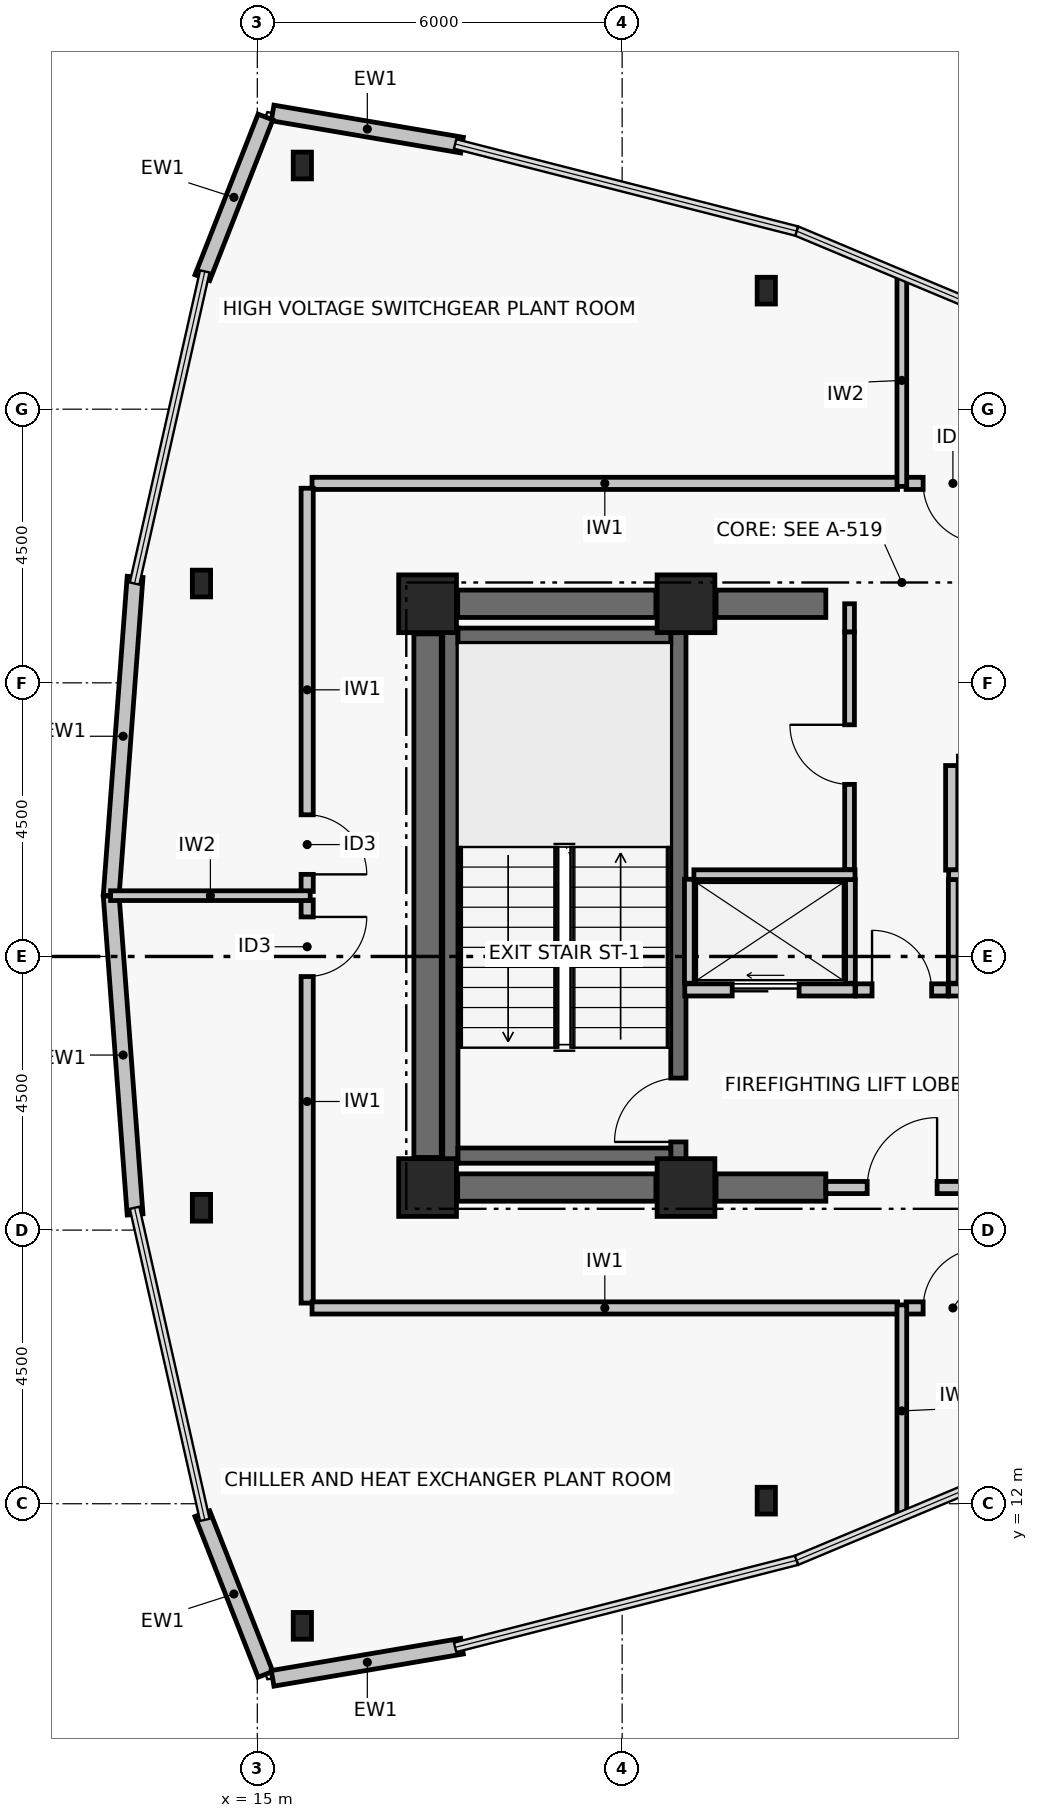
"""IFC4 building model, lengths in metres.
Left out: names, types, materials, properties, quantities, classifications, styles, units other than length and angle.
Written with IfcOpenShell. Run it as: python <this file> out.ifc"""

import sys

from ifc_helpers import new_model, si_unit, direction, frame, frame_2d, origin, origin_2d, place, context, subcontext, project, spatial, rectangle, i_section, extrude, element, fill, save


model = new_model("IFC4")
c1 = context("Model", 3, precision=1e-05, world=origin(), true_north=direction((0.0, 1.0)))
c2 = subcontext(c1, "Body", "Model", "MODEL_VIEW")
j1 = project(units=[si_unit("LENGTHUNIT", "METRE"), si_unit("PLANEANGLEUNIT", "RADIAN")], contexts=[c1])
p1 = place(None, origin())
s1 = spatial("IfcSite", under=j1, at=p1, CompositionType="ELEMENT")
p2 = place(p1, origin())
s2 = spatial("IfcBuilding", under=s1, at=p2, CompositionType="ELEMENT")
p3 = place(p2, frame((0.0, 0.0, 299.22)))
s3 = spatial("IfcBuildingStorey", under=s2, at=p3, CompositionType="ELEMENT", Elevation=299.22)
for number, where, z_axis, x_axis in (
    (1, (17.8, 17.2, 0.0), (0.0, 0.0, 1.0), (1.0, 0.0, 0.0)),
    (2, (22.05, 17.2, 0.0), (0.0, 0.0, 1.0), (1.0, 0.0, 0.0)),
    (3, (17.8, 26.8, 0.0), (0.0, 0.0, 1.0), (1.0, 0.0, 0.0)),
    (4, (22.05, 26.8, 0.0), (0.0, 0.0, 1.0), (1.0, 0.0, 0.0)),
):
    element("IfcColumn", number, at=place(p3, frame(where, z_axis=z_axis, x_axis=x_axis)), inside=s3, PredefinedType="COLUMN", context=c2, shape_type="SweptSolid", body=[
        extrude(rectangle(XDim=0.95, YDim=0.95, at=origin_2d()), origin(), (0.0, 0.0, 1.0), 3.2),
    ])
p4 = place(p3, frame((18.295, 17.2, 0.0), z_axis=(0.0, 0.0, 1.0), x_axis=(1.0, 0.0, 0.0)))
e5 = element("IfcWall", 5, at=p4, inside=s3, PredefinedType="SHEAR", context=c2, shape_type="SweptSolid", body=[
    extrude(rectangle(XDim=3.26, YDim=0.45, at=frame_2d((1.63, 0.0))), origin(), (0.0, 0.0, 1.0), 2.98),
])
p5 = place(p3, frame((22.545, 17.2, 0.0), z_axis=(0.0, 0.0, 1.0), x_axis=(1.0, 0.0, 0.0)))
e6 = element("IfcWall", 6, at=p5, inside=s3, PredefinedType="SHEAR", context=c2, shape_type="SweptSolid", body=[
    extrude(rectangle(XDim=1.805, YDim=0.45, at=frame_2d((0.903, 0.0))), origin(), (0.0, 0.0, 1.0), 2.98),
])
p6 = place(p3, frame((18.295, 26.8, 0.0), z_axis=(0.0, 0.0, 1.0), x_axis=(1.0, 0.0, 0.0)))
e7 = element("IfcWall", 7, at=p6, inside=s3, PredefinedType="SHEAR", context=c2, shape_type="SweptSolid", body=[
    extrude(rectangle(XDim=3.26, YDim=0.45, at=frame_2d((1.63, 0.0))), origin(), (0.0, 0.0, 1.0), 2.98),
])
p7 = place(p3, frame((22.545, 26.8, 0.0), z_axis=(0.0, 0.0, 1.0), x_axis=(1.0, 0.0, 0.0)))
e8 = element("IfcWall", 8, at=p7, inside=s3, PredefinedType="SHEAR", context=c2, shape_type="SweptSolid", body=[
    extrude(rectangle(XDim=1.805, YDim=0.45, at=frame_2d((0.903, 0.0))), origin(), (0.0, 0.0, 1.0), 2.98),
])
p8 = place(p3, frame((17.8, 17.695, 0.0), z_axis=(0.0, 0.0, 1.0), x_axis=(0.0, 1.0, 0.0)))
e9 = element("IfcWall", 9, at=p8, inside=s3, PredefinedType="SHEAR", context=c2, shape_type="SweptSolid", body=[
    extrude(rectangle(XDim=8.61, YDim=0.45, at=frame_2d((4.305, 0.0))), origin(), (0.0, 0.0, 1.0), 2.98),
])
p9 = place(p3, frame((18.175, 17.6, 0.0), z_axis=(0.0, 0.0, 1.0), x_axis=(0.0, 1.0, 0.0)))
e10 = element("IfcWall", 10, at=p9, inside=s3, PredefinedType="SHEAR", context=c2, shape_type="SweptSolid", body=[
    extrude(rectangle(XDim=8.8, YDim=0.25, at=frame_2d((4.4, 0.0))), origin(), (0.0, 0.0, 1.0), 2.98),
])
p10 = place(p3, frame((21.925, 17.6, 0.0), z_axis=(0.0, 0.0, 1.0), x_axis=(0.0, 1.0, 0.0)))
e11 = element("IfcWall", 11, at=p10, inside=s3, PredefinedType="SHEAR", context=c2, shape_type="SweptSolid", body=[
    extrude(rectangle(XDim=8.8, YDim=0.25, at=frame_2d((4.4, 0.0))), origin(), (0.0, 0.0, 1.0), 2.98),
])
p11 = place(p10, frame((0.35, 0.0, 0.0)))
e12 = element("IfcOpeningElement", 12, at=p11, cuts=e11, PredefinedType="OPENING", context=c2, shape_type="SweptSolid", body=[
    extrude(rectangle(XDim=1.05, YDim=2.08, at=frame_2d((0.525, 1.04))), frame((0.0, 0.135, 0.0), z_axis=(0.0, -1.0, 0.0), x_axis=(1.0, 0.0, 0.0)), (0.0, 0.0, 1.0), 0.27),
])
for number, where, z_axis, x_axis in (
    (13, (18.3, 17.725, 0.0), (0.0, 0.0, 1.0), (1.0, 0.0, 0.0)),
    (14, (18.3, 26.275, 0.0), (0.0, 0.0, 1.0), (1.0, 0.0, 0.0)),
):
    element("IfcWall", number, at=place(p3, frame(where, z_axis=z_axis, x_axis=x_axis)), inside=s3, PredefinedType="SHEAR", context=c2, shape_type="SweptSolid", body=[
        extrude(rectangle(XDim=3.5, YDim=0.25, at=frame_2d((1.75, 0.0))), origin(), (0.0, 0.0, 1.0), 2.98),
    ])
for number, where, z_axis, x_axis in (
    (15, (23.371, 31.949, 0.0), (0.0, 0.0, 1.0), (1.0, 0.0, 0.0)),
    (16, (15.74, 34.008, 0.0), (0.0, 0.0, 1.0), (1.0, 0.0, 0.0)),
    (17, (14.081, 27.133, 0.0), (0.0, 0.0, 1.0), (1.0, 0.0, 0.0)),
    (18, (14.081, 16.867, 0.0), (0.0, 0.0, 1.0), (1.0, 0.0, 0.0)),
    (19, (15.74, 9.992, 0.0), (0.0, 0.0, 1.0), (1.0, 0.0, 0.0)),
    (20, (23.371, 12.051, 0.0), (0.0, 0.0, 1.0), (1.0, 0.0, 0.0)),
):
    element("IfcColumn", number, at=place(p3, frame(where, z_axis=z_axis, x_axis=x_axis)), inside=s3, PredefinedType="COLUMN", context=c2, shape_type="SweptSolid", body=[
        extrude(i_section(OverallWidth=0.3, OverallDepth=0.44, WebThickness=0.011, FlangeThickness=0.018, at=origin_2d()), origin(), (0.0, 0.0, 1.0), 3.2),
    ])
p12 = place(p3, frame((15.252, 34.872, 0.0), z_axis=(0.0, 0.0, 1.0), x_axis=(0.985905089134, -0.167305574383, 0.0)))
e21 = element("IfcWall", 21, at=p12, inside=s3, PredefinedType="PARTITIONING", context=c2, shape_type="SweptSolid", body=[
    extrude(rectangle(XDim=3.159, YDim=0.26, at=frame_2d((1.58, 0.0))), origin(), (0.0, 0.0, 1.0), 2.98),
])
p13 = place(p3, frame((14.096, 32.163, 0.0), z_axis=(0.0, 0.0, 1.0), x_axis=(0.365495346637, 0.930813166853, 0.0)))
e22 = element("IfcWall", 22, at=p13, inside=s3, PredefinedType="PARTITIONING", context=c2, shape_type="SweptSolid", body=[
    extrude(rectangle(XDim=2.838, YDim=0.26, at=frame_2d((1.419, 0.0))), origin(), (0.0, 0.0, 1.0), 2.98),
])
for number, where, z_axis, x_axis in (
    (23, (12.596, 22.0, 0.0), (0.0, 0.0, 1.0), (0.075, 0.997, 0.0)),
    (24, (12.99, 16.758, 0.0), (0.0, 0.0, 1.0), (-0.075, 0.997, 0.0)),
):
    element("IfcWall", number, at=place(p3, frame(where, z_axis=z_axis, x_axis=x_axis)), inside=s3, PredefinedType="PARTITIONING", context=c2, shape_type="SweptSolid", body=[
        extrude(rectangle(XDim=5.257, YDim=0.26, at=frame_2d((2.628, 0.0))), origin(), (0.0, 0.0, 1.0), 2.98),
    ])
p14 = place(p3, frame((15.134, 9.195, 0.0), z_axis=(0.0, 0.0, 1.0), x_axis=(-0.365495346637, 0.930813166853, 0.0)))
e25 = element("IfcWall", 25, at=p14, inside=s3, PredefinedType="PARTITIONING", context=c2, shape_type="SweptSolid", body=[
    extrude(rectangle(XDim=2.838, YDim=0.26, at=frame_2d((1.419, 0.0))), origin(), (0.0, 0.0, 1.0), 2.98),
])
p15 = place(p3, frame((18.366, 9.657, 0.0), z_axis=(0.0, 0.0, 1.0), x_axis=(-0.985905089134, -0.167305574383, 0.0)))
e26 = element("IfcWall", 26, at=p15, inside=s3, PredefinedType="PARTITIONING", context=c2, shape_type="SweptSolid", body=[
    extrude(rectangle(XDim=3.159, YDim=0.26, at=frame_2d((1.58, 0.0))), origin(), (0.0, 0.0, 1.0), 2.98),
])
p16 = place(p3, frame((24.35, 17.2, 0.0), z_axis=(0.0, 0.0, 1.0), x_axis=(1.0, 0.0, 0.0)))
e27 = element("IfcWall", 27, at=p16, inside=s3, PredefinedType="PARTITIONING", context=c2, shape_type="SweptSolid", body=[
    extrude(rectangle(XDim=2.5, YDim=0.2, at=frame_2d((1.25, 0.0))), origin(), (0.0, 0.0, 1.0), 2.11),
])
p17 = place(p16, frame((0.68, 0.0, 0.0)))
e28 = element("IfcOpeningElement", 28, at=p17, cuts=e27, PredefinedType="OPENING", context=c2, shape_type="SweptSolid", body=[
    extrude(rectangle(XDim=1.15, YDim=2.08, at=frame_2d((0.575, 1.04))), frame((0.0, 0.11, 0.0), z_axis=(0.0, -1.0, 0.0), x_axis=(1.0, 0.0, 0.0)), (0.0, 0.0, 1.0), 0.22),
])
p18 = place(p3, frame((24.84, 20.45, 0.0), z_axis=(0.0, 0.0, 1.0), x_axis=(1.0, 0.0, 0.0)))
e29 = element("IfcWall", 29, at=p18, inside=s3, PredefinedType="PARTITIONING", context=c2, shape_type="SweptSolid", body=[
    extrude(rectangle(XDim=1.52, YDim=0.2, at=frame_2d((0.76, 0.0))), origin(), (0.0, 0.0, 1.0), 2.98),
])
p19 = place(p18, frame((0.27, 0.0, 0.0)))
e30 = element("IfcOpeningElement", 30, at=p19, cuts=e29, PredefinedType="OPENING", context=c2, shape_type="SweptSolid", body=[
    extrude(rectangle(XDim=0.98, YDim=2.06, at=frame_2d((0.49, 1.03))), frame((0.0, 0.11, 0.0), z_axis=(0.0, -1.0, 0.0), x_axis=(1.0, 0.0, 0.0)), (0.0, 0.0, 1.0), 0.22),
])
p20 = place(p3, frame((22.03, 20.45, 0.0), z_axis=(0.0, 0.0, 1.0), x_axis=(1.0, 0.0, 0.0)))
e31 = element("IfcWall", 31, at=p20, inside=s3, PredefinedType="PARTITIONING", context=c2, shape_type="SweptSolid", body=[
    extrude(rectangle(XDim=2.8, YDim=0.2, at=frame_2d((1.4, 0.0))), origin(), (0.0, 0.0, 1.0), 2.98),
])
p21 = place(p20, frame((0.78, 0.0, 0.0)))
e32 = element("IfcOpeningElement", 32, at=p21, cuts=e31, PredefinedType="OPENING", context=c2, shape_type="SweptSolid", body=[
    extrude(rectangle(XDim=1.1, YDim=2.08, at=frame_2d((0.55, 1.04))), frame((0.0, 0.11, 0.0), z_axis=(0.0, -1.0, 0.0), x_axis=(1.0, 0.0, 0.0)), (0.0, 0.0, 1.0), 0.22),
])
p22 = place(p3, frame((26.37, 20.45, 0.0), z_axis=(0.0, 0.0, 1.0), x_axis=(1.0, 0.0, 0.0)))
e33 = element("IfcWall", 33, at=p22, inside=s3, PredefinedType="PARTITIONING", context=c2, shape_type="SweptSolid", body=[
    extrude(rectangle(XDim=2.8, YDim=0.2, at=frame_2d((1.4, 0.0))), origin(), (0.0, 0.0, 1.0), 2.98),
])
p23 = place(p22, frame((0.78, 0.0, 0.0)))
e34 = element("IfcOpeningElement", 34, at=p23, cuts=e33, PredefinedType="OPENING", context=c2, shape_type="SweptSolid", body=[
    extrude(rectangle(XDim=1.1, YDim=2.08, at=frame_2d((0.55, 1.04))), frame((0.0, 0.11, 0.0), z_axis=(0.0, -1.0, 0.0), x_axis=(1.0, 0.0, 0.0)), (0.0, 0.0, 1.0), 0.22),
])
p24 = place(p3, frame((26.42, 22.42, 0.0), z_axis=(0.0, 0.0, 1.0), x_axis=(0.0, 1.0, 0.0)))
e35 = element("IfcWall", 35, at=p24, inside=s3, PredefinedType="PARTITIONING", context=c2, shape_type="SweptSolid", body=[
    extrude(rectangle(XDim=1.72, YDim=0.2, at=frame_2d((0.86, 0.0))), origin(), (0.0, 0.0, 1.0), 2.98),
])
for number, where, z_axis, x_axis in (
    (36, (22.105, 20.56, 0.0), (0.0, 0.0, 1.0), (0.0, 1.0, 0.0)),
    (37, (24.755, 20.56, 0.0), (0.0, 0.0, 1.0), (0.0, 1.0, 0.0)),
):
    element("IfcWall", number, at=place(p3, frame(where, z_axis=z_axis, x_axis=x_axis)), inside=s3, PredefinedType="PARTITIONING", context=c2, shape_type="SweptSolid", body=[
        extrude(rectangle(XDim=1.71, YDim=0.16, at=frame_2d((0.855, 0.0))), origin(), (0.0, 0.0, 1.0), 2.98),
    ])
p25 = place(p3, frame((22.18, 22.345, 0.0), z_axis=(0.0, 0.0, 1.0), x_axis=(1.0, 0.0, 0.0)))
e38 = element("IfcWall", 38, at=p25, inside=s3, PredefinedType="PARTITIONING", context=c2, shape_type="SweptSolid", body=[
    extrude(rectangle(XDim=2.65, YDim=0.16, at=frame_2d((1.325, 0.0))), origin(), (0.0, 0.0, 1.0), 2.98),
])
p26 = place(p3, frame((26.445, 20.56, 0.0), z_axis=(0.0, 0.0, 1.0), x_axis=(0.0, 1.0, 0.0)))
e39 = element("IfcWall", 39, at=p26, inside=s3, PredefinedType="PARTITIONING", context=c2, shape_type="SweptSolid", body=[
    extrude(rectangle(XDim=1.71, YDim=0.16, at=frame_2d((0.855, 0.0))), origin(), (0.0, 0.0, 1.0), 2.98),
])
p27 = place(p3, frame((26.37, 22.345, 0.0), z_axis=(0.0, 0.0, 1.0), x_axis=(1.0, 0.0, 0.0)))
e40 = element("IfcWall", 40, at=p27, inside=s3, PredefinedType="PARTITIONING", context=c2, shape_type="SweptSolid", body=[
    extrude(rectangle(XDim=2.65, YDim=0.16, at=frame_2d((1.325, 0.0))), origin(), (0.0, 0.0, 1.0), 2.98),
])
p28 = place(p3, frame((24.74, 26.335, 0.0), z_axis=(0.0, 0.0, 1.0), x_axis=(0.0, 1.0, 0.0)))
e41 = element("IfcWall", 41, at=p28, inside=s3, PredefinedType="PARTITIONING", context=c2, shape_type="SweptSolid", body=[
    extrude(rectangle(XDim=0.465, YDim=0.16, at=frame_2d((0.232, 0.0))), origin(), (0.0, 0.0, 1.0), 2.11),
])
p29 = place(p3, frame((24.74, 22.43, 0.0), z_axis=(0.0, 0.0, 1.0), x_axis=(0.0, 1.0, 0.0)))
e42 = element("IfcWall", 42, at=p29, inside=s3, PredefinedType="PARTITIONING", context=c2, shape_type="SweptSolid", body=[
    extrude(rectangle(XDim=3.905, YDim=0.16, at=frame_2d((1.953, 0.0))), origin(), (0.0, 0.0, 1.0), 2.98),
])
p30 = place(p29, frame((1.4, 0.0, 0.0)))
e43 = element("IfcOpeningElement", 43, at=p30, cuts=e42, PredefinedType="OPENING", context=c2, shape_type="SweptSolid", body=[
    extrude(rectangle(XDim=0.98, YDim=2.06, at=frame_2d((0.49, 1.03))), frame((0.0, 0.09, 0.0), z_axis=(0.0, -1.0, 0.0), x_axis=(1.0, 0.0, 0.0)), (0.0, 0.0, 1.0), 0.18),
])
p31 = place(p3, frame((15.82, 21.93, 0.0), z_axis=(0.0, 0.0, 1.0), x_axis=(0.0, -1.0, 0.0)))
e44 = element("IfcWall", 44, at=p31, inside=s3, PredefinedType="PARTITIONING", context=c2, shape_type="SweptSolid", body=[
    extrude(rectangle(XDim=6.63, YDim=0.2, at=frame_2d((3.315, 0.0))), origin(), (0.0, 0.0, 1.0), 2.31),
])
p32 = place(p31, frame((0.28, 0.0, 0.0)))
e45 = element("IfcOpeningElement", 45, at=p32, cuts=e44, PredefinedType="OPENING", context=c2, shape_type="SweptSolid", body=[
    extrude(rectangle(XDim=0.98, YDim=2.06, at=frame_2d((0.49, 1.03))), frame((0.0, 0.11, 0.0), z_axis=(0.0, -1.0, 0.0), x_axis=(1.0, 0.0, 0.0)), (0.0, 0.0, 1.0), 0.22),
])
p33 = place(p3, frame((15.9, 15.22, 0.0), z_axis=(0.0, 0.0, 1.0), x_axis=(1.0, 0.0, 0.0)))
e46 = element("IfcWall", 46, at=p33, inside=s3, PredefinedType="PARTITIONING", context=c2, shape_type="SweptSolid", body=[
    extrude(rectangle(XDim=9.63, YDim=0.2, at=frame_2d((4.815, 0.0))), origin(), (0.0, 0.0, 1.0), 2.31),
])
p34 = place(p3, frame((25.67, 15.22, 0.0), z_axis=(0.0, 0.0, 1.0), x_axis=(1.0, 0.0, 0.0)))
e47 = element("IfcWall", 47, at=p34, inside=s3, PredefinedType="PARTITIONING", context=c2, shape_type="SweptSolid", body=[
    extrude(rectangle(XDim=3.036, YDim=0.2, at=frame_2d((1.518, 0.0))), origin(), (0.0, 0.0, 1.0), 2.98),
])
p35 = place(p34, frame((0.28, 0.0, 0.0)))
e48 = element("IfcOpeningElement", 48, at=p35, cuts=e47, PredefinedType="OPENING", context=c2, shape_type="SweptSolid", body=[
    extrude(rectangle(XDim=0.98, YDim=2.06, at=frame_2d((0.49, 1.03))), frame((0.0, 0.11, 0.0), z_axis=(0.0, -1.0, 0.0), x_axis=(1.0, 0.0, 0.0)), (0.0, 0.0, 1.0), 0.22),
])
p36 = place(p3, frame((28.706, 28.78, 0.0), z_axis=(0.0, 0.0, 1.0), x_axis=(-1.0, 0.0, 0.0)))
e49 = element("IfcWall", 49, at=p36, inside=s3, PredefinedType="PARTITIONING", context=c2, shape_type="SweptSolid", body=[
    extrude(rectangle(XDim=3.036, YDim=0.2, at=frame_2d((1.518, 0.0))), origin(), (0.0, 0.0, 1.0), 2.98),
])
p37 = place(p36, frame((1.776, 0.0, 0.0)))
e50 = element("IfcOpeningElement", 50, at=p37, cuts=e49, PredefinedType="OPENING", context=c2, shape_type="SweptSolid", body=[
    extrude(rectangle(XDim=0.98, YDim=2.06, at=frame_2d((0.49, 1.03))), frame((0.0, 0.11, 0.0), z_axis=(0.0, -1.0, 0.0), x_axis=(1.0, 0.0, 0.0)), (0.0, 0.0, 1.0), 0.22),
])
p38 = place(p3, frame((25.53, 28.78, 0.0), z_axis=(0.0, 0.0, 1.0), x_axis=(-1.0, 0.0, 0.0)))
e51 = element("IfcWall", 51, at=p38, inside=s3, PredefinedType="PARTITIONING", context=c2, shape_type="SweptSolid", body=[
    extrude(rectangle(XDim=9.63, YDim=0.2, at=frame_2d((4.815, 0.0))), origin(), (0.0, 0.0, 1.0), 2.31),
])
p39 = place(p3, frame((15.82, 28.7, 0.0), z_axis=(0.0, 0.0, 1.0), x_axis=(0.0, -1.0, 0.0)))
e52 = element("IfcWall", 52, at=p39, inside=s3, PredefinedType="PARTITIONING", context=c2, shape_type="SweptSolid", body=[
    extrude(rectangle(XDim=6.63, YDim=0.2, at=frame_2d((3.315, 0.0))), origin(), (0.0, 0.0, 1.0), 2.31),
])
p40 = place(p39, frame((5.37, 0.0, 0.0)))
e53 = element("IfcOpeningElement", 53, at=p40, cuts=e52, PredefinedType="OPENING", context=c2, shape_type="SweptSolid", body=[
    extrude(rectangle(XDim=0.98, YDim=2.06, at=frame_2d((0.49, 1.03))), frame((0.0, 0.11, 0.0), z_axis=(0.0, -1.0, 0.0), x_axis=(1.0, 0.0, 0.0)), (0.0, 0.0, 1.0), 0.22),
])
for number, where, z_axis, x_axis in (
    (54, (25.6, 11.783, 0.0), (0.0, 0.0, 1.0), (0.0, 1.0, 0.0)),
    (55, (25.6, 28.73, 0.0), (0.0, 0.0, 1.0), (0.0, 1.0, 0.0)),
):
    element("IfcWall", number, at=place(p3, frame(where, z_axis=z_axis, x_axis=x_axis)), inside=s3, PredefinedType="PARTITIONING", context=c2, shape_type="SweptSolid", body=[
        extrude(rectangle(XDim=3.487, YDim=0.16, at=frame_2d((1.743, 0.0))), origin(), (0.0, 0.0, 1.0), 2.46),
    ])
p41 = place(p3, frame((12.586, 22.0, 0.0), z_axis=(0.0, 0.0, 1.0), x_axis=(1.0, 0.0, 0.0)))
e56 = element("IfcWall", 56, at=p41, inside=s3, PredefinedType="PARTITIONING", context=c2, shape_type="SweptSolid", body=[
    extrude(rectangle(XDim=3.284, YDim=0.16, at=frame_2d((1.642, 0.0))), origin(), (0.0, 0.0, 1.0), 2.46),
])
p42 = place(p11, origin())
e57 = element("IfcDoor", 57, at=p42, inside=s3, OperationType="SINGLE_SWING_LEFT", PredefinedType="DOOR", context=c2, shape_type="SweptSolid", body=[
    extrude(rectangle(XDim=1.05, YDim=2.08, at=frame_2d((0.525, 1.04))), frame((0.0, 0.025, 0.0), z_axis=(0.0, -1.0, 0.0), x_axis=(1.0, 0.0, 0.0)), (0.0, 0.0, 1.0), 0.05),
])
fill(e12, e57)
p43 = place(p17, origin())
e58 = element("IfcDoor", 58, at=p43, inside=s3, OperationType="SINGLE_SWING_RIGHT", PredefinedType="DOOR", context=c2, shape_type="SweptSolid", body=[
    extrude(rectangle(XDim=1.15, YDim=2.08, at=frame_2d((0.575, 1.04))), frame((0.0, 0.025, 0.0), z_axis=(0.0, -1.0, 0.0), x_axis=(1.0, 0.0, 0.0)), (0.0, 0.0, 1.0), 0.05),
])
fill(e28, e58)
p44 = place(p19, origin())
e59 = element("IfcDoor", 59, at=p44, inside=s3, OperationType="SINGLE_SWING_LEFT", PredefinedType="DOOR", context=c2, shape_type="SweptSolid", body=[
    extrude(rectangle(XDim=0.98, YDim=2.06, at=frame_2d((0.49, 1.03))), frame((0.0, 0.025, 0.0), z_axis=(0.0, -1.0, 0.0), x_axis=(1.0, 0.0, 0.0)), (0.0, 0.0, 1.0), 0.05),
])
fill(e30, e59)
p45 = place(p21, origin())
e60 = element("IfcDoor", 60, at=p45, inside=s3, OperationType="DOUBLE_DOOR_SLIDING", PredefinedType="DOOR", context=c2, shape_type="SweptSolid", body=[
    extrude(rectangle(XDim=1.1, YDim=2.08, at=frame_2d((0.55, 1.04))), frame((0.0, 0.025, 0.0), z_axis=(0.0, -1.0, 0.0), x_axis=(1.0, 0.0, 0.0)), (0.0, 0.0, 1.0), 0.05),
])
fill(e32, e60)
p46 = place(p30, origin())
e61 = element("IfcDoor", 61, at=p46, inside=s3, OperationType="SINGLE_SWING_RIGHT", PredefinedType="DOOR", context=c2, shape_type="SweptSolid", body=[
    extrude(rectangle(XDim=0.98, YDim=2.06, at=frame_2d((0.49, 1.03))), frame((0.0, 0.025, 0.0), z_axis=(0.0, -1.0, 0.0), x_axis=(1.0, 0.0, 0.0)), (0.0, 0.0, 1.0), 0.05),
])
fill(e43, e61)
p47 = place(p32, origin())
e62 = element("IfcDoor", 62, at=p47, inside=s3, OperationType="SINGLE_SWING_LEFT", PredefinedType="DOOR", context=c2, shape_type="SweptSolid", body=[
    extrude(rectangle(XDim=0.98, YDim=2.06, at=frame_2d((0.49, 1.03))), frame((0.0, 0.025, 0.0), z_axis=(0.0, -1.0, 0.0), x_axis=(1.0, 0.0, 0.0)), (0.0, 0.0, 1.0), 0.05),
])
fill(e45, e62)
p48 = place(p35, origin())
e63 = element("IfcDoor", 63, at=p48, inside=s3, OperationType="SINGLE_SWING_RIGHT", PredefinedType="DOOR", context=c2, shape_type="SweptSolid", body=[
    extrude(rectangle(XDim=0.98, YDim=2.06, at=frame_2d((0.49, 1.03))), frame((0.0, 0.025, 0.0), z_axis=(0.0, -1.0, 0.0), x_axis=(1.0, 0.0, 0.0)), (0.0, 0.0, 1.0), 0.05),
])
fill(e48, e63)
p49 = place(p37, origin())
e64 = element("IfcDoor", 64, at=p49, inside=s3, OperationType="SINGLE_SWING_LEFT", PredefinedType="DOOR", context=c2, shape_type="SweptSolid", body=[
    extrude(rectangle(XDim=0.98, YDim=2.06, at=frame_2d((0.49, 1.03))), frame((0.0, 0.025, 0.0), z_axis=(0.0, -1.0, 0.0), x_axis=(1.0, 0.0, 0.0)), (0.0, 0.0, 1.0), 0.05),
])
fill(e50, e64)
p50 = place(p40, origin())
e65 = element("IfcDoor", 65, at=p50, inside=s3, OperationType="SINGLE_SWING_RIGHT", PredefinedType="DOOR", context=c2, shape_type="SweptSolid", body=[
    extrude(rectangle(XDim=0.98, YDim=2.06, at=frame_2d((0.49, 1.03))), frame((0.0, 0.025, 0.0), z_axis=(0.0, -1.0, 0.0), x_axis=(1.0, 0.0, 0.0)), (0.0, 0.0, 1.0), 0.05),
])
fill(e53, e65)
save(model, sys.argv[1])
